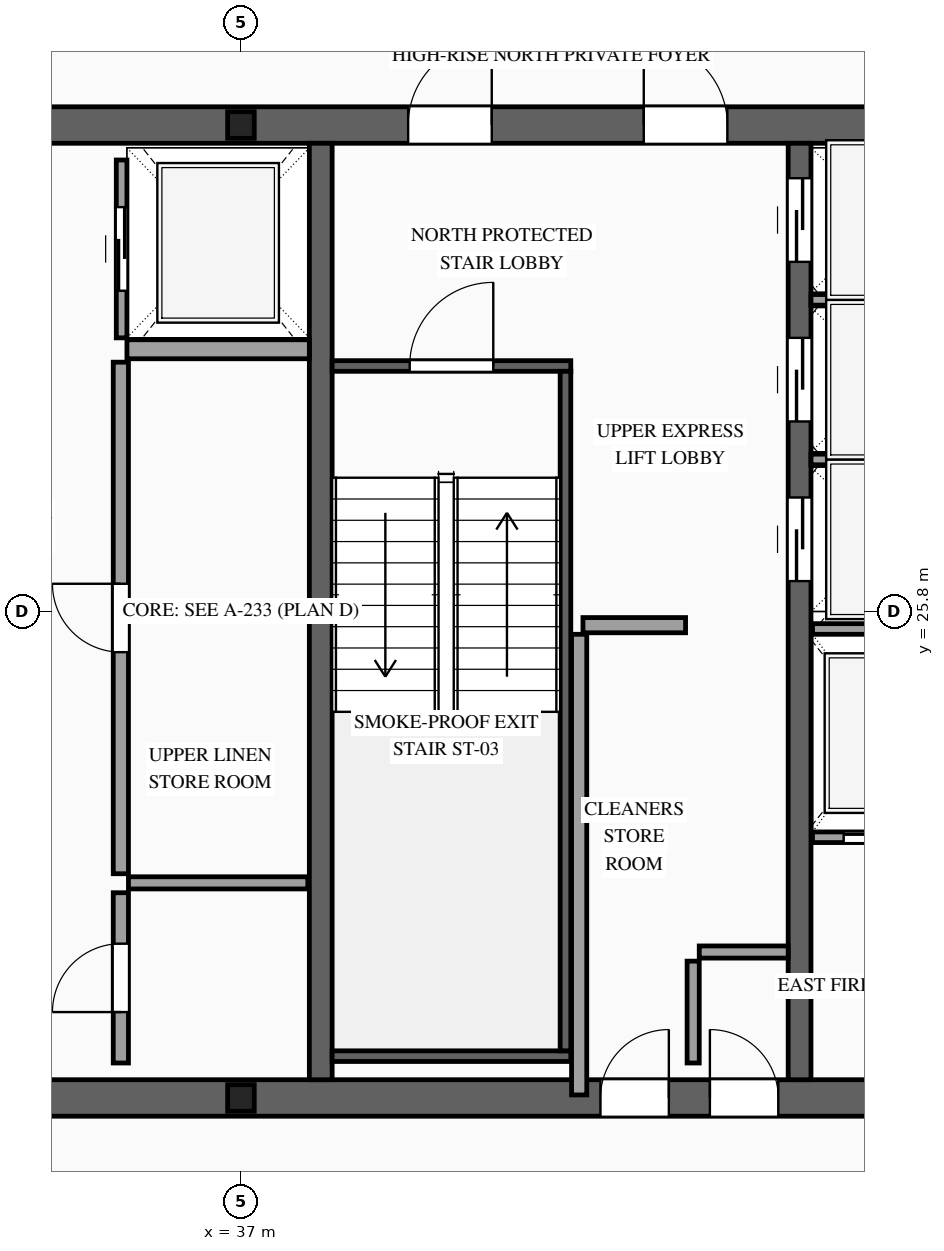
"""IFC4 building model, lengths in metres.
Left out: names, types, materials, properties, quantities, classifications, styles, units other than length and angle.
Written with IfcOpenShell. Run it as: python <this file> out.ifc"""

import sys

from ifc_helpers import new_model, si_unit, direction, frame, frame_2d, origin, origin_2d, place, context, subcontext, project, spatial, rectangle, i_section, extrude, source, transform, mapped, element, fill, save


model = new_model("IFC4")
c1 = context("Model", 3, precision=1e-05, world=origin(), true_north=direction((0.0, 1.0)))
c2 = subcontext(c1, "Body", "Model", "MODEL_VIEW")
j1 = project(units=[si_unit("LENGTHUNIT", "METRE"), si_unit("PLANEANGLEUNIT", "RADIAN")], contexts=[c1])
p1 = place(None, origin())
s1 = spatial("IfcSite", under=j1, at=p1, CompositionType="ELEMENT")
p2 = place(p1, origin())
s2 = spatial("IfcBuilding", under=s1, at=p2, CompositionType="ELEMENT")
p3 = place(p2, frame((0.0, 0.0, 339.2)))
s3 = spatial("IfcBuildingStorey", under=s2, at=p3, CompositionType="ELEMENT", Elevation=339.2)
p4 = place(p3, frame((23.56, 19.4, 0.0), z_axis=(0.0, 0.0, 1.0), x_axis=(1.0, 0.0, 0.0)))
e1 = element("IfcWall", 1, at=p4, inside=s3, PredefinedType="SHEAR", context=c2, shape_type="SweptSolid", body=[
    extrude(rectangle(XDim=26.88, YDim=0.48, at=frame_2d((13.44, 0.0))), origin(), (0.0, 0.0, 1.0), 4.0),
])
p5 = place(p4, frame((1.89, 0.0, 0.0)))
e2 = element("IfcOpeningElement", 2, at=p5, cuts=e1, PredefinedType="OPENING", context=c2, shape_type="SweptSolid", body=[
    extrude(rectangle(XDim=1.1, YDim=2.2, at=frame_2d((0.55, 1.1))), frame((0.0, 0.255, 0.0), z_axis=(0.0, -1.0, 0.0), x_axis=(1.0, 0.0, 0.0)), (0.0, 0.0, 1.0), 0.51),
])
p6 = place(p4, frame((9.79, 0.0, 0.0)))
e3 = element("IfcOpeningElement", 3, at=p6, cuts=e1, PredefinedType="OPENING", context=c2, shape_type="SweptSolid", body=[
    extrude(rectangle(XDim=1.1, YDim=2.2, at=frame_2d((0.55, 1.1))), frame((0.0, 0.255, 0.0), z_axis=(0.0, -1.0, 0.0), x_axis=(1.0, 0.0, 0.0)), (0.0, 0.0, 1.0), 0.51),
])
p7 = place(p4, frame((22.99, 0.0, 0.0)))
e4 = element("IfcOpeningElement", 4, at=p7, cuts=e1, PredefinedType="OPENING", context=c2, shape_type="SweptSolid", body=[
    extrude(rectangle(XDim=1.1, YDim=2.2, at=frame_2d((0.55, 1.1))), frame((0.0, 0.255, 0.0), z_axis=(0.0, -1.0, 0.0), x_axis=(1.0, 0.0, 0.0)), (0.0, 0.0, 1.0), 0.51),
])
p8 = place(p4, frame((19.61, 0.0, 0.0)))
e5 = element("IfcOpeningElement", 5, at=p8, cuts=e1, PredefinedType="OPENING", context=c2, shape_type="SweptSolid", body=[
    extrude(rectangle(XDim=0.9, YDim=2.15, at=frame_2d((0.45, 1.075))), frame((0.0, 0.255, 0.0), z_axis=(0.0, -1.0, 0.0), x_axis=(1.0, 0.0, 0.0)), (0.0, 0.0, 1.0), 0.51),
])
p9 = place(p4, frame((18.17, 0.0, 0.0)))
e6 = element("IfcOpeningElement", 6, at=p9, cuts=e1, PredefinedType="OPENING", context=c2, shape_type="SweptSolid", body=[
    extrude(rectangle(XDim=0.9, YDim=2.15, at=frame_2d((0.45, 1.075))), frame((0.0, 0.255, 0.0), z_axis=(0.0, -1.0, 0.0), x_axis=(1.0, 0.0, 0.0)), (0.0, 0.0, 1.0), 0.51),
])
p10 = place(p3, frame((23.56, 32.2, 0.0), z_axis=(0.0, 0.0, 1.0), x_axis=(1.0, 0.0, 0.0)))
e7 = element("IfcWall", 7, at=p10, inside=s3, PredefinedType="SHEAR", context=c2, shape_type="SweptSolid", body=[
    extrude(rectangle(XDim=26.88, YDim=0.48, at=frame_2d((13.44, 0.0))), origin(), (0.0, 0.0, 1.0), 4.0),
])
p11 = place(p10, frame((4.51, 0.0, 0.0)))
e8 = element("IfcOpeningElement", 8, at=p11, cuts=e7, PredefinedType="OPENING", context=c2, shape_type="SweptSolid", body=[
    extrude(rectangle(XDim=0.9, YDim=2.15, at=frame_2d((0.45, 1.075))), frame((0.0, 0.255, 0.0), z_axis=(0.0, -1.0, 0.0), x_axis=(1.0, 0.0, 0.0)), (0.0, 0.0, 1.0), 0.51),
])
p12 = place(p10, frame((9.79, 0.0, 0.0)))
e9 = element("IfcOpeningElement", 9, at=p12, cuts=e7, PredefinedType="OPENING", context=c2, shape_type="SweptSolid", body=[
    extrude(rectangle(XDim=1.1, YDim=2.2, at=frame_2d((0.55, 1.1))), frame((0.0, 0.255, 0.0), z_axis=(0.0, -1.0, 0.0), x_axis=(1.0, 0.0, 0.0)), (0.0, 0.0, 1.0), 0.51),
])
p13 = place(p10, frame((15.64, 0.0, 0.0)))
e10 = element("IfcOpeningElement", 10, at=p13, cuts=e7, PredefinedType="OPENING", context=c2, shape_type="SweptSolid", body=[
    extrude(rectangle(XDim=1.1, YDim=2.2, at=frame_2d((0.55, 1.1))), frame((0.0, 0.255, 0.0), z_axis=(0.0, -1.0, 0.0), x_axis=(1.0, 0.0, 0.0)), (0.0, 0.0, 1.0), 0.51),
])
p14 = place(p10, frame((18.74, 0.0, 0.0)))
e11 = element("IfcOpeningElement", 11, at=p14, cuts=e7, PredefinedType="OPENING", context=c2, shape_type="SweptSolid", body=[
    extrude(rectangle(XDim=1.1, YDim=2.2, at=frame_2d((0.55, 1.1))), frame((0.0, 0.255, 0.0), z_axis=(0.0, -1.0, 0.0), x_axis=(1.0, 0.0, 0.0)), (0.0, 0.0, 1.0), 0.51),
])
m1 = source(origin(), c2, "Body", "SweptSolid", [
    extrude(rectangle(XDim=12.32, YDim=0.3, at=frame_2d((6.16, 0.0))), origin(), (0.0, 0.0, 1.0), 4.0),
])
p15 = place(p3, frame((38.05, 19.64, 0.0), z_axis=(0.0, 0.0, 1.0), x_axis=(0.0, 1.0, 0.0)))
e12 = element("IfcWall", 12, at=p15, inside=s3, PredefinedType="SOLIDWALL", context=c2, shape_type="MappedRepresentation", body=[
    mapped(m1, transform((0.0, 0.0, 0.0), scale=1.0)),
])
p16 = place(p3, frame((44.35, 19.64, 0.0), z_axis=(0.0, 0.0, 1.0), x_axis=(0.0, 1.0, 0.0)))
e13 = element("IfcWall", 13, at=p16, inside=s3, PredefinedType="SOLIDWALL", context=c2, shape_type="SweptSolid", body=[
    extrude(rectangle(XDim=12.32, YDim=0.3, at=frame_2d((6.16, 0.0))), origin(), (0.0, 0.0, 1.0), 4.0),
])
p17 = place(p16, frame((6.56, 0.0, 0.0)))
e14 = element("IfcOpeningElement", 14, at=p17, cuts=e13, PredefinedType="OPENING", context=c2, shape_type="SweptSolid", body=[
    extrude(rectangle(XDim=1.1, YDim=2.2, at=frame_2d((0.55, 1.1))), frame((0.0, 0.165, 0.0), z_axis=(0.0, -1.0, 0.0), x_axis=(1.0, 0.0, 0.0)), (0.0, 0.0, 1.0), 0.33),
])
p18 = place(p16, frame((8.66, 0.0, 0.0)))
e15 = element("IfcOpeningElement", 15, at=p18, cuts=e13, PredefinedType="OPENING", context=c2, shape_type="SweptSolid", body=[
    extrude(rectangle(XDim=1.1, YDim=2.2, at=frame_2d((0.55, 1.1))), frame((0.0, 0.165, 0.0), z_axis=(0.0, -1.0, 0.0), x_axis=(1.0, 0.0, 0.0)), (0.0, 0.0, 1.0), 0.33),
])
p19 = place(p16, frame((10.76, 0.0, 0.0)))
e16 = element("IfcOpeningElement", 16, at=p19, cuts=e13, PredefinedType="OPENING", context=c2, shape_type="SweptSolid", body=[
    extrude(rectangle(XDim=1.1, YDim=2.2, at=frame_2d((0.55, 1.1))), frame((0.0, 0.165, 0.0), z_axis=(0.0, -1.0, 0.0), x_axis=(1.0, 0.0, 0.0)), (0.0, 0.0, 1.0), 0.33),
])
m2 = source(origin(), c2, "Body", "SweptSolid", [
    extrude(i_section(OverallWidth=0.35, OverallDepth=0.35, WebThickness=0.012, FlangeThickness=0.019, at=origin_2d()), origin(), (0.0, 0.0, 1.0), 4.0),
])
for number, where, z_axis, x_axis in (
    (17, (37.0, 19.4, 0.0), (0.0, 0.0, 1.0), (1.0, 0.0, 0.0)),
    (18, (37.0, 32.2, 0.0), (0.0, 0.0, 1.0), (1.0, 0.0, 0.0)),
):
    element("IfcColumn", number, at=place(p3, frame(where, z_axis=z_axis, x_axis=x_axis)), inside=s3, PredefinedType="COLUMN", context=c2, shape_type="MappedRepresentation", body=[
        mapped(m2, transform((0.0, 0.0, 0.0), scale=1.0)),
    ])
p20 = place(p3, frame((44.52, 22.83, 0.0), z_axis=(0.0, 0.0, 1.0), x_axis=(1.0, 0.0, 0.0)))
e19 = element("IfcWall", 19, at=p20, inside=s3, PredefinedType="SOLIDWALL", context=c2, shape_type="SweptSolid", body=[
    extrude(rectangle(XDim=1.92, YDim=0.14, at=frame_2d((0.96, 0.0))), origin(), (0.0, 0.0, 1.0), 3.76),
])
p21 = place(p20, frame((0.41, 0.0, 0.0)))
e20 = element("IfcOpeningElement", 20, at=p21, cuts=e19, PredefinedType="OPENING", context=c2, shape_type="SweptSolid", body=[
    extrude(rectangle(XDim=1.1, YDim=2.2, at=frame_2d((0.55, 1.1))), frame((0.0, 0.085, 0.0), z_axis=(0.0, -1.0, 0.0), x_axis=(1.0, 0.0, 0.0)), (0.0, 0.0, 1.0), 0.17),
])
m3 = source(origin(), c2, "Body", "SweptSolid", [
    extrude(rectangle(XDim=1.92, YDim=0.14, at=frame_2d((0.96, 0.0))), origin(), (0.0, 0.0, 1.0), 3.76),
])
p22 = place(p3, frame((44.52, 25.57, 0.0), z_axis=(0.0, 0.0, 1.0), x_axis=(1.0, 0.0, 0.0)))
e21 = element("IfcWall", 21, at=p22, inside=s3, PredefinedType="SOLIDWALL", context=c2, shape_type="MappedRepresentation", body=[
    mapped(m3, transform((0.0, 0.0, 0.0), scale=1.0)),
])
p23 = place(p3, frame((35.43, 29.4, 0.0), z_axis=(0.0, 0.0, 1.0), x_axis=(0.0, 1.0, 0.0)))
e22 = element("IfcWall", 22, at=p23, inside=s3, PredefinedType="SOLIDWALL", context=c2, shape_type="SweptSolid", body=[
    extrude(rectangle(XDim=2.34, YDim=0.14, at=frame_2d((1.17, 0.0))), origin(), (0.0, 0.0, 1.0), 3.76),
])
p24 = place(p23, frame((0.62, 0.0, 0.0)))
e23 = element("IfcOpeningElement", 23, at=p24, cuts=e22, PredefinedType="OPENING", context=c2, shape_type="SweptSolid", body=[
    extrude(rectangle(XDim=1.1, YDim=2.2, at=frame_2d((0.55, 1.1))), frame((0.0, 0.085, 0.0), z_axis=(0.0, -1.0, 0.0), x_axis=(1.0, 0.0, 0.0)), (0.0, 0.0, 1.0), 0.17),
])
m4 = source(origin(), c2, "Body", "SweptSolid", [
    extrude(rectangle(XDim=2.4, YDim=0.25, at=frame_2d((1.2, 0.0))), origin(), (0.0, 0.0, 1.0), 3.76),
])
p25 = place(p3, frame((35.5, 29.25, 0.0), z_axis=(0.0, 0.0, 1.0), x_axis=(1.0, 0.0, 0.0)))
e24 = element("IfcWall", 24, at=p25, inside=s3, PredefinedType="SOLIDWALL", context=c2, shape_type="MappedRepresentation", body=[
    mapped(m4, transform((0.0, 0.0, 0.0), scale=1.0)),
])
m5 = source(origin(), c2, "Body", "SweptSolid", [
    extrude(rectangle(XDim=2.0, YDim=0.14, at=frame_2d((1.0, 0.0))), origin(), (0.0, 0.0, 1.0), 3.76),
])
for number, where, z_axis, x_axis in (
    (25, (44.5, 27.8, 0.0), (0.0, 0.0, 1.0), (1.0, 0.0, 0.0)),
    (26, (44.5, 29.9, 0.0), (0.0, 0.0, 1.0), (1.0, 0.0, 0.0)),
):
    element("IfcWall", number, at=place(p3, frame(where, z_axis=z_axis, x_axis=x_axis)), inside=s3, PredefinedType="SOLIDWALL", context=c2, shape_type="MappedRepresentation", body=[
        mapped(m5, transform((0.0, 0.0, 0.0), scale=1.0)),
    ])
p26 = place(p3, frame((38.2, 29.03, 0.0), z_axis=(0.0, 0.0, 1.0), x_axis=(1.0, 0.0, 0.0)))
e27 = element("IfcWall", 27, at=p26, inside=s3, PredefinedType="SOLIDWALL", context=c2, shape_type="SweptSolid", body=[
    extrude(rectangle(XDim=3.14, YDim=0.14, at=frame_2d((1.57, 0.0))), origin(), (0.0, 0.0, 1.0), 3.76),
])
p27 = place(p26, frame((1.02, 0.0, 0.0)))
e28 = element("IfcOpeningElement", 28, at=p27, cuts=e27, PredefinedType="OPENING", context=c2, shape_type="SweptSolid", body=[
    extrude(rectangle(XDim=1.1, YDim=2.2, at=frame_2d((0.55, 1.1))), frame((0.0, 0.085, 0.0), z_axis=(0.0, -1.0, 0.0), x_axis=(1.0, 0.0, 0.0)), (0.0, 0.0, 1.0), 0.17),
])
m6 = source(origin(), c2, "Body", "SweptSolid", [
    extrude(rectangle(XDim=3.14, YDim=0.14, at=frame_2d((1.57, 0.0))), origin(), (0.0, 0.0, 1.0), 3.76),
])
p28 = place(p3, frame((38.2, 19.95, 0.0), z_axis=(0.0, 0.0, 1.0), x_axis=(1.0, 0.0, 0.0)))
e29 = element("IfcWall", 29, at=p28, inside=s3, PredefinedType="SOLIDWALL", context=c2, shape_type="MappedRepresentation", body=[
    mapped(m6, transform((0.0, 0.0, 0.0), scale=1.0)),
])
m7 = source(origin(), c2, "Body", "SweptSolid", [
    extrude(rectangle(XDim=8.94, YDim=0.14, at=frame_2d((4.47, 0.0))), origin(), (0.0, 0.0, 1.0), 3.76),
])
p29 = place(p3, frame((41.27, 20.02, 0.0), z_axis=(0.0, 0.0, 1.0), x_axis=(0.0, 1.0, 0.0)))
e30 = element("IfcWall", 30, at=p29, inside=s3, PredefinedType="SOLIDWALL", context=c2, shape_type="MappedRepresentation", body=[
    mapped(m7, transform((0.0, 0.0, 0.0), scale=1.0)),
])
p30 = place(p3, frame((35.42, 19.86, 0.0), z_axis=(0.0, 0.0, 1.0), x_axis=(0.0, 1.0, 0.0)))
e31 = element("IfcWall", 31, at=p30, inside=s3, PredefinedType="PARTITIONING", context=c2, shape_type="SweptSolid", body=[
    extrude(rectangle(XDim=2.24, YDim=0.2, at=frame_2d((1.12, 0.0))), origin(), (0.0, 0.0, 1.0), 3.76),
])
p31 = place(p30, frame((0.67, 0.0, 0.0)))
e32 = element("IfcOpeningElement", 32, at=p31, cuts=e31, PredefinedType="OPENING", context=c2, shape_type="SweptSolid", body=[
    extrude(rectangle(XDim=0.9, YDim=2.15, at=frame_2d((0.45, 1.075))), frame((0.0, 0.115, 0.0), z_axis=(0.0, -1.0, 0.0), x_axis=(1.0, 0.0, 0.0)), (0.0, 0.0, 1.0), 0.23),
])
p32 = place(p3, frame((35.42, 22.35, 0.0), z_axis=(0.0, 0.0, 1.0), x_axis=(0.0, 1.0, 0.0)))
e33 = element("IfcWall", 33, at=p32, inside=s3, PredefinedType="PARTITIONING", context=c2, shape_type="SweptSolid", body=[
    extrude(rectangle(XDim=6.73, YDim=0.2, at=frame_2d((3.365, 0.0))), origin(), (0.0, 0.0, 1.0), 3.76),
])
p33 = place(p32, frame((2.915, 0.0, 0.0)))
e34 = element("IfcOpeningElement", 34, at=p33, cuts=e33, PredefinedType="OPENING", context=c2, shape_type="SweptSolid", body=[
    extrude(rectangle(XDim=0.9, YDim=2.15, at=frame_2d((0.45, 1.075))), frame((0.0, 0.115, 0.0), z_axis=(0.0, -1.0, 0.0), x_axis=(1.0, 0.0, 0.0)), (0.0, 0.0, 1.0), 0.23),
])
m8 = source(origin(), c2, "Body", "SweptSolid", [
    extrude(rectangle(XDim=2.36, YDim=0.16, at=frame_2d((1.18, 0.0))), origin(), (0.0, 0.0, 1.0), 3.76),
])
p34 = place(p3, frame((35.52, 22.23, 0.0), z_axis=(0.0, 0.0, 1.0), x_axis=(1.0, 0.0, 0.0)))
e35 = element("IfcWall", 35, at=p34, inside=s3, PredefinedType="PARTITIONING", context=c2, shape_type="MappedRepresentation", body=[
    mapped(m8, transform((0.0, 0.0, 0.0), scale=1.0)),
])
m9 = source(origin(), c2, "Body", "SweptSolid", [
    extrude(rectangle(XDim=1.34, YDim=0.16, at=frame_2d((0.67, 0.0))), origin(), (0.0, 0.0, 1.0), 3.76),
])
p35 = place(p3, frame((42.95, 19.86, 0.0), z_axis=(0.0, 0.0, 1.0), x_axis=(0.0, 1.0, 0.0)))
e36 = element("IfcWall", 36, at=p35, inside=s3, PredefinedType="PARTITIONING", context=c2, shape_type="MappedRepresentation", body=[
    mapped(m9, transform((0.0, 0.0, 0.0), scale=1.0)),
])
m10 = source(origin(), c2, "Body", "SweptSolid", [
    extrude(rectangle(XDim=1.17, YDim=0.16, at=frame_2d((0.585, 0.0))), origin(), (0.0, 0.0, 1.0), 3.76),
])
p36 = place(p3, frame((43.03, 21.32, 0.0), z_axis=(0.0, 0.0, 1.0), x_axis=(1.0, 0.0, 0.0)))
e37 = element("IfcWall", 37, at=p36, inside=s3, PredefinedType="PARTITIONING", context=c2, shape_type="MappedRepresentation", body=[
    mapped(m10, transform((0.0, 0.0, 0.0), scale=1.0)),
])
m11 = source(origin(), c2, "Body", "SweptSolid", [
    extrude(rectangle(XDim=6.06, YDim=0.2, at=frame_2d((3.03, 0.0))), origin(), (0.0, 0.0, 1.0), 3.76),
])
p37 = place(p3, frame((41.45, 19.44, 0.0), z_axis=(0.0, 0.0, 1.0), x_axis=(0.0, 1.0, 0.0)))
e38 = element("IfcWall", 38, at=p37, inside=s3, PredefinedType="PARTITIONING", context=c2, shape_type="MappedRepresentation", body=[
    mapped(m11, transform((0.0, 0.0, 0.0), scale=1.0)),
])
m12 = source(origin(), c2, "Body", "SweptSolid", [
    extrude(rectangle(XDim=1.35, YDim=0.2, at=frame_2d((0.675, 0.0))), origin(), (0.0, 0.0, 1.0), 3.76),
])
p38 = place(p3, frame((41.5, 25.62, 0.0), z_axis=(0.0, 0.0, 1.0), x_axis=(1.0, 0.0, 0.0)))
e39 = element("IfcWall", 39, at=p38, inside=s3, PredefinedType="PARTITIONING", context=c2, shape_type="MappedRepresentation", body=[
    mapped(m12, transform((0.0, 0.0, 0.0), scale=1.0)),
])
m13 = source(origin(), c2, "Body", "SweptSolid", [
    extrude(rectangle(XDim=1.1, YDim=2.2, at=frame_2d((0.55, 1.1))), frame((0.0, 0.025, 0.0), z_axis=(0.0, -1.0, 0.0), x_axis=(1.0, 0.0, 0.0)), (0.0, 0.0, 1.0), 0.05),
])
p39 = place(p21, origin())
e40 = element("IfcDoor", 40, at=p39, inside=s3, OperationType="SLIDING_TO_RIGHT", PredefinedType="DOOR", context=c2, shape_type="MappedRepresentation", body=[
    mapped(m13, transform((0.0, 0.0, 0.0), scale=1.0)),
])
fill(e20, e40)
p40 = place(p24, origin())
e41 = element("IfcDoor", 41, at=p40, inside=s3, OperationType="SLIDING_TO_RIGHT", PredefinedType="DOOR", context=c2, shape_type="MappedRepresentation", body=[
    mapped(m13, transform((0.0, 0.0, 0.0), scale=1.0)),
])
fill(e23, e41)
p41 = place(p17, origin())
e42 = element("IfcDoor", 42, at=p41, inside=s3, OperationType="SLIDING_TO_LEFT", PredefinedType="DOOR", context=c2, shape_type="MappedRepresentation", body=[
    mapped(m13, transform((0.0, 0.0, 0.0), scale=1.0)),
])
fill(e14, e42)
p42 = place(p18, origin())
e43 = element("IfcDoor", 43, at=p42, inside=s3, OperationType="SLIDING_TO_RIGHT", PredefinedType="DOOR", context=c2, shape_type="MappedRepresentation", body=[
    mapped(m13, transform((0.0, 0.0, 0.0), scale=1.0)),
])
fill(e15, e43)
p43 = place(p19, origin())
e44 = element("IfcDoor", 44, at=p43, inside=s3, OperationType="SLIDING_TO_LEFT", PredefinedType="DOOR", context=c2, shape_type="MappedRepresentation", body=[
    mapped(m13, transform((0.0, 0.0, 0.0), scale=1.0)),
])
fill(e16, e44)
m14 = source(origin(), c2, "Body", "SweptSolid", [
    extrude(rectangle(XDim=1.1, YDim=2.2, at=frame_2d((0.55, 1.1))), frame((0.0, 0.025, 0.0), z_axis=(0.0, -1.0, 0.0), x_axis=(1.0, 0.0, 0.0)), (0.0, 0.0, 1.0), 0.05),
])
p44 = place(p27, origin())
e45 = element("IfcDoor", 45, at=p44, inside=s3, OperationType="SINGLE_SWING_RIGHT", PredefinedType="DOOR", context=c2, shape_type="MappedRepresentation", body=[
    mapped(m14, transform((0.0, 0.0, 0.0), scale=1.0)),
])
fill(e28, e45)
p45 = place(p13, origin())
e46 = element("IfcDoor", 46, at=p45, inside=s3, OperationType="SINGLE_SWING_RIGHT", PredefinedType="DOOR", context=c2, shape_type="MappedRepresentation", body=[
    mapped(m14, transform((0.0, 0.0, 0.0), scale=1.0)),
])
fill(e10, e46)
p46 = place(p14, origin())
e47 = element("IfcDoor", 47, at=p46, inside=s3, OperationType="SINGLE_SWING_LEFT", PredefinedType="DOOR", context=c2, shape_type="MappedRepresentation", body=[
    mapped(m14, transform((0.0, 0.0, 0.0), scale=1.0)),
])
fill(e11, e47)
m15 = source(origin(), c2, "Body", "SweptSolid", [
    extrude(rectangle(XDim=0.9, YDim=2.15, at=frame_2d((0.45, 1.075))), frame((0.0, 0.025, 0.0), z_axis=(0.0, -1.0, 0.0), x_axis=(1.0, 0.0, 0.0)), (0.0, 0.0, 1.0), 0.05),
])
p47 = place(p31, origin())
e48 = element("IfcDoor", 48, at=p47, inside=s3, OperationType="SINGLE_SWING_LEFT", PredefinedType="DOOR", context=c2, shape_type="MappedRepresentation", body=[
    mapped(m15, transform((0.0, 0.0, 0.0), scale=1.0)),
])
fill(e32, e48)
p48 = place(p33, origin())
e49 = element("IfcDoor", 49, at=p48, inside=s3, OperationType="SINGLE_SWING_RIGHT", PredefinedType="DOOR", context=c2, shape_type="MappedRepresentation", body=[
    mapped(m15, transform((0.0, 0.0, 0.0), scale=1.0)),
])
fill(e34, e49)
p49 = place(p8, origin())
e50 = element("IfcDoor", 50, at=p49, inside=s3, OperationType="SINGLE_SWING_LEFT", PredefinedType="DOOR", context=c2, shape_type="MappedRepresentation", body=[
    mapped(m15, transform((0.0, 0.0, 0.0), scale=1.0)),
])
fill(e5, e50)
p50 = place(p9, origin())
e51 = element("IfcDoor", 51, at=p50, inside=s3, OperationType="SINGLE_SWING_RIGHT", PredefinedType="DOOR", context=c2, shape_type="MappedRepresentation", body=[
    mapped(m15, transform((0.0, 0.0, 0.0), scale=1.0)),
])
fill(e6, e51)
save(model, sys.argv[1])
